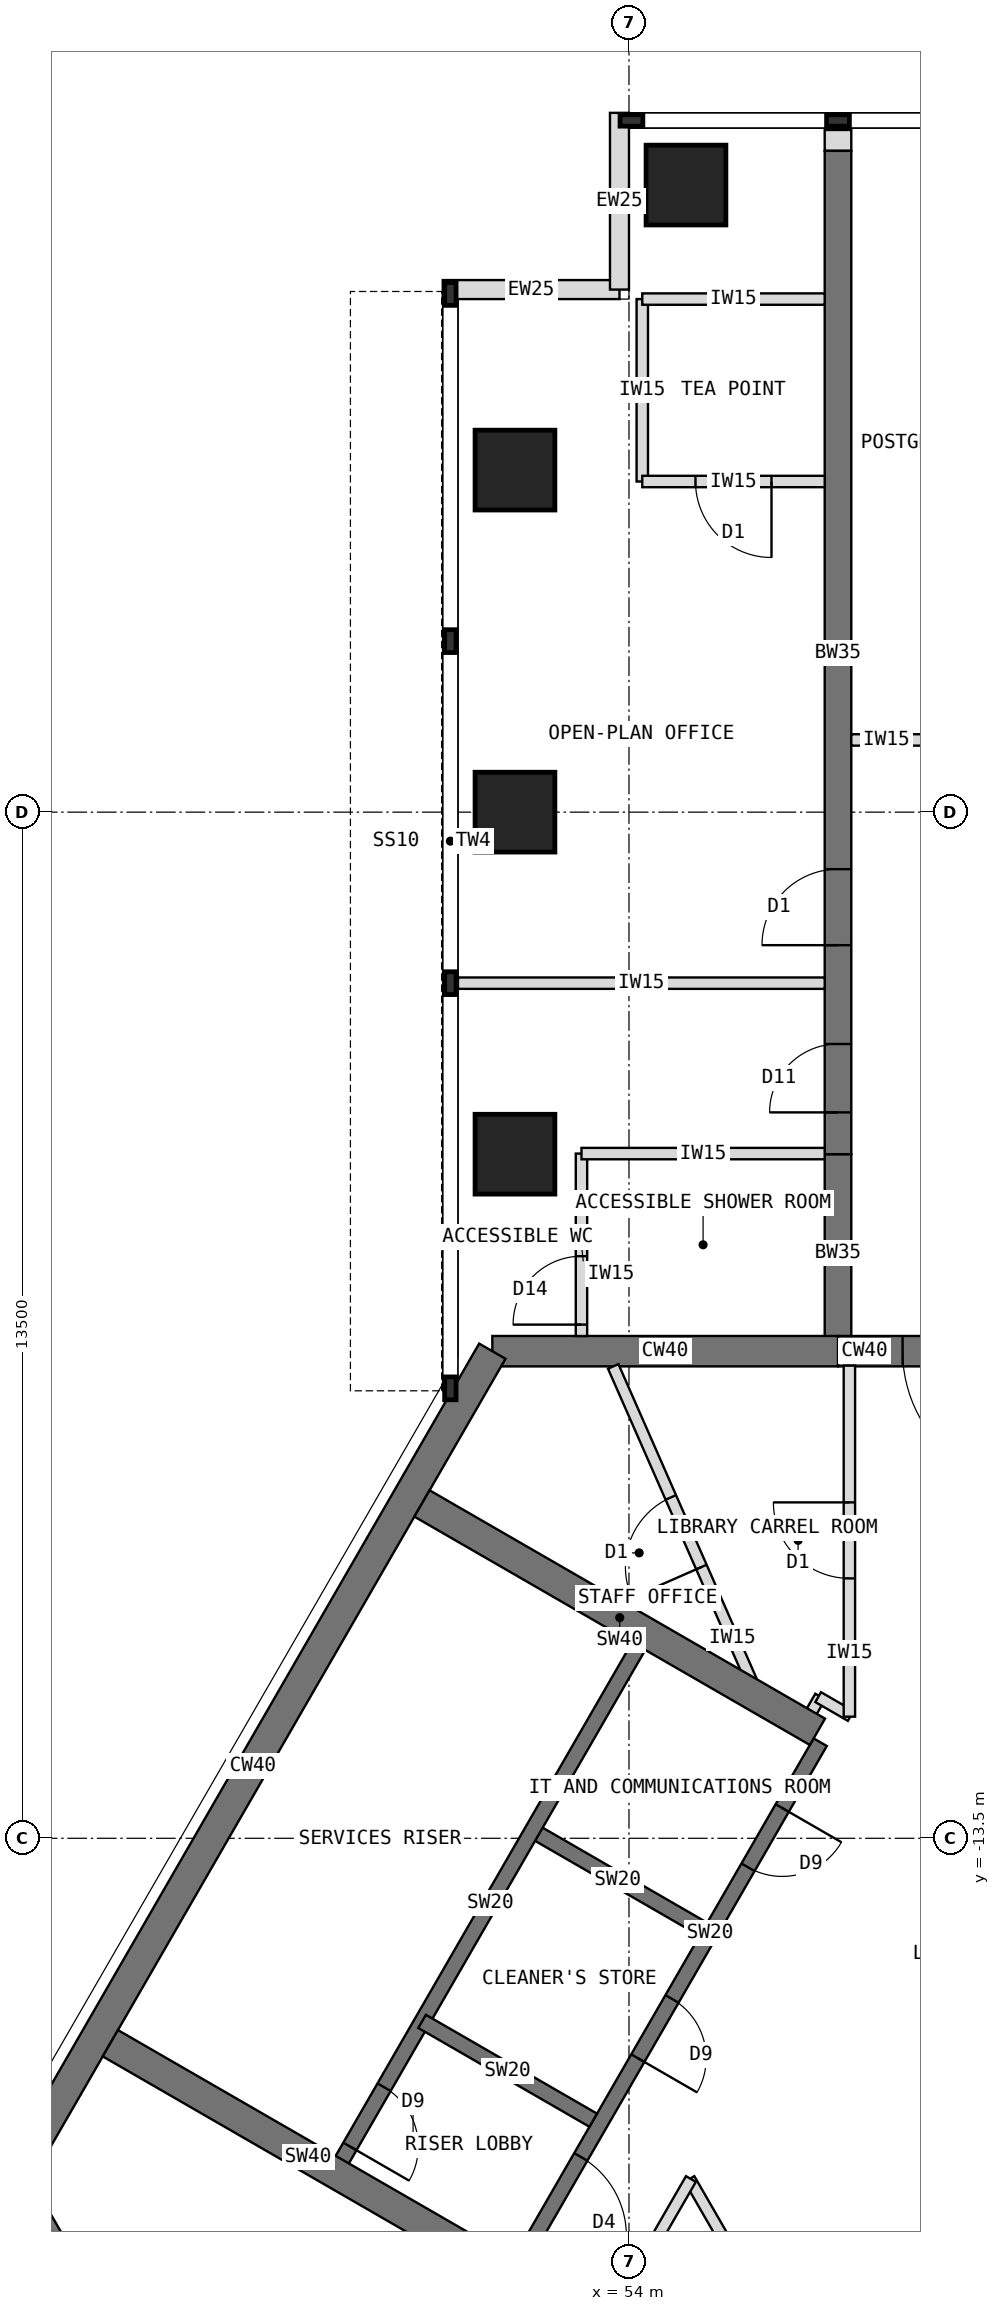
"""IFC4 building model, lengths in metres.
Left out: names, types, materials, properties, quantities, classifications, styles, units other than length and angle.
Written with IfcOpenShell. Run it as: python <this file> out.ifc"""

import sys

from ifc_helpers import new_model, si_unit, direction, frame, frame_2d, origin, origin_2d, place, context, subcontext, project, spatial, rectangle, extrude, element, fill, save


model = new_model("IFC4")
c1 = context("Model", 3, precision=1e-05, world=origin(), true_north=direction((0.0, 1.0)))
c2 = subcontext(c1, "Body", "Model", "MODEL_VIEW")
j1 = project(units=[si_unit("LENGTHUNIT", "METRE"), si_unit("PLANEANGLEUNIT", "RADIAN")], contexts=[c1])
p1 = place(None, origin())
s1 = spatial("IfcSite", under=j1, at=p1, CompositionType="ELEMENT")
p2 = place(p1, origin())
s2 = spatial("IfcBuilding", under=s1, at=p2, CompositionType="ELEMENT")
p3 = place(p2, frame((0.0, 0.0, 251.5)))
s3 = spatial("IfcBuildingStorey", under=s2, at=p3, CompositionType="ELEMENT", Elevation=251.5)
p4 = place(p3, frame((60.25, -7.092, 0.0), z_axis=(0.0, 0.0, 1.0), x_axis=(-1.0, 0.0, 0.0)))
e1 = element("IfcWall", 1, at=p4, inside=s3, PredefinedType="SHEAR", context=c2, shape_type="SweptSolid", body=[
    extrude(rectangle(XDim=3.5, YDim=0.4, at=frame_2d((1.75, 0.0))), origin(), (0.0, 0.0, 1.0), 4.0),
])
p5 = place(p4, frame((0.85, 0.0, 0.0)))
e2 = element("IfcOpeningElement", 2, at=p5, cuts=e1, PredefinedType="OPENING", context=c2, shape_type="SweptSolid", body=[
    extrude(rectangle(XDim=1.8, YDim=2.1, at=frame_2d((0.9, 1.05))), frame((0.0, 0.21, 0.0), z_axis=(0.0, -1.0, 0.0), x_axis=(1.0, 0.0, 0.0)), (0.0, 0.0, 1.0), 0.42),
])
p6 = place(p3, frame((56.75, -7.092, 0.0), z_axis=(0.0, 0.0, 1.0), x_axis=(-1.0, 0.0, 0.0)))
e3 = element("IfcWall", 3, at=p6, inside=s3, PredefinedType="SHEAR", context=c2, shape_type="SweptSolid", body=[
    extrude(rectangle(XDim=4.548, YDim=0.4, at=frame_2d((2.274, 0.0))), origin(), (0.0, 0.0, 1.0), 4.0),
])
p7 = place(p3, frame((52.202, -7.092, 0.0), z_axis=(0.0, 0.0, 1.0), x_axis=(-0.500005998175, -0.866021940709, 0.0)))
e4 = element("IfcWall", 4, at=p7, inside=s3, PredefinedType="SHEAR", context=c2, shape_type="SweptSolid", body=[
    extrude(rectangle(XDim=12.596, YDim=0.4, at=frame_2d((6.298, 0.0))), origin(), (0.0, 0.0, 1.0), 4.0),
])
p8 = place(p3, frame((45.904, -18.0, 0.0), z_axis=(0.0, 0.0, 1.0), x_axis=(0.500024481964, -0.866011268655, 0.0)))
e5 = element("IfcWall", 5, at=p8, inside=s3, PredefinedType="SHEAR", context=c2, shape_type="SweptSolid", body=[
    extrude(rectangle(XDim=4.548, YDim=0.4, at=frame_2d((2.274, 0.0))), origin(), (0.0, 0.0, 1.0), 4.0),
])
p9 = place(p3, frame((56.75, -7.092, 0.0), z_axis=(0.0, 0.0, 1.0), x_axis=(0.0, 1.0, 0.0)))
e6 = element("IfcWall", 6, at=p9, inside=s3, PredefinedType="SHEAR", context=c2, shape_type="SweptSolid", body=[
    extrude(rectangle(XDim=2.592, YDim=0.35, at=frame_2d((1.296, 0.0))), origin(), (0.0, 0.0, 1.0), 4.0),
])
p10 = place(p3, frame((56.75, -4.5, 0.0), z_axis=(0.0, 0.0, 1.0), x_axis=(0.0, 1.0, 0.0)))
e7 = element("IfcWall", 7, at=p10, inside=s3, PredefinedType="SHEAR", context=c2, shape_type="SweptSolid", body=[
    extrude(rectangle(XDim=13.2, YDim=0.35, at=frame_2d((6.6, 0.0))), origin(), (0.0, 0.0, 1.0), 4.0),
])
p11 = place(p10, frame((0.55, 0.0, 0.0)))
e8 = element("IfcOpeningElement", 8, at=p11, cuts=e7, PredefinedType="OPENING", context=c2, shape_type="SweptSolid", body=[
    extrude(rectangle(XDim=0.9, YDim=2.1, at=frame_2d((0.45, 1.05))), frame((0.0, 0.185, 0.0), z_axis=(0.0, -1.0, 0.0), x_axis=(1.0, 0.0, 0.0)), (0.0, 0.0, 1.0), 0.37),
])
p12 = place(p10, frame((2.75, 0.0, 0.0)))
e9 = element("IfcOpeningElement", 9, at=p12, cuts=e7, PredefinedType="OPENING", context=c2, shape_type="SweptSolid", body=[
    extrude(rectangle(XDim=1.0, YDim=2.1, at=frame_2d((0.5, 1.05))), frame((0.0, 0.185, 0.0), z_axis=(0.0, -1.0, 0.0), x_axis=(1.0, 0.0, 0.0)), (0.0, 0.0, 1.0), 0.37),
])
for number, where, z_axis, x_axis in (
    (10, (52.5, -4.5, 0.0), (0.0, 0.0, 1.0), (1.0, 0.0, 0.0)),
    (11, (52.5, 0.0, 0.0), (0.0, 0.0, 1.0), (1.0, 0.0, 0.0)),
    (12, (52.5, 4.5, 0.0), (0.0, 0.0, 1.0), (1.0, 0.0, 0.0)),
    (13, (54.75, 8.25, 0.0), (0.0, 0.0, 1.0), (1.0, 0.0, 0.0)),
):
    element("IfcColumn", number, at=place(p3, frame(where, z_axis=z_axis, x_axis=x_axis)), inside=s3, PredefinedType="COLUMN", context=c2, shape_type="SweptSolid", body=[
        extrude(rectangle(XDim=1.05, YDim=1.05, at=origin_2d()), origin(), (0.0, 0.0, 1.0), 4.0),
    ])
for number, where, z_axis, x_axis in (
    (14, (51.55, 6.875, 0.0), (0.0, 0.0, 1.0), (1.0, 0.0, 0.0)),
    (15, (53.875, 6.875, 0.0), (0.0, 0.0, 1.0), (0.0, 1.0, 0.0)),
):
    element("IfcWall", number, at=place(p3, frame(where, z_axis=z_axis, x_axis=x_axis)), inside=s3, PredefinedType="STANDARD", context=c2, shape_type="SweptSolid", body=[
        extrude(rectangle(XDim=2.325, YDim=0.25, at=frame_2d((1.163, 0.0))), origin(), (0.0, 0.0, 1.0), 3.8),
    ])
p13 = place(p3, frame((56.75, 8.7, 0.0), z_axis=(0.0, 0.0, 1.0), x_axis=(0.0, 1.0, 0.0)))
e16 = element("IfcWall", 16, at=p13, inside=s3, PredefinedType="PARTITIONING", context=c2, shape_type="SweptSolid", body=[
    extrude(rectangle(XDim=0.275, YDim=0.35, at=frame_2d((0.138, 0.0))), origin(), (0.0, 0.0, 1.0), 3.8),
])
p14 = place(p3, frame((56.516, -12.236, 0.0), z_axis=(0.0, 0.0, 1.0), x_axis=(-0.49999894854, -0.866026010844, 0.0)))
e17 = element("IfcWall", 17, at=p14, inside=s3, PredefinedType="SHEAR", context=c2, shape_type="SweptSolid", body=[
    extrude(rectangle(XDim=8.0, YDim=0.2, at=frame_2d((4.0, 0.0))), origin(), (0.0, 0.0, 1.0), 4.0),
])
p15 = place(p14, frame((6.3, 0.0, 0.0)))
e18 = element("IfcOpeningElement", 18, at=p15, cuts=e17, PredefinedType="OPENING", context=c2, shape_type="SweptSolid", body=[
    extrude(rectangle(XDim=1.2, YDim=2.1, at=frame_2d((0.6, 1.05))), frame((0.0, 0.11, 0.0), z_axis=(0.0, -1.0, 0.0), x_axis=(1.0, 0.0, 0.0)), (0.0, 0.0, 1.0), 0.22),
])
p16 = place(p14, frame((1.0, 0.0, 0.0)))
e19 = element("IfcOpeningElement", 19, at=p16, cuts=e17, PredefinedType="OPENING", context=c2, shape_type="SweptSolid", body=[
    extrude(rectangle(XDim=0.9, YDim=2.1, at=frame_2d((0.45, 1.05))), frame((0.0, 0.11, 0.0), z_axis=(0.0, -1.0, 0.0), x_axis=(1.0, 0.0, 0.0)), (0.0, 0.0, 1.0), 0.22),
])
p17 = place(p14, frame((3.9, 0.0, 0.0)))
e20 = element("IfcOpeningElement", 20, at=p17, cuts=e17, PredefinedType="OPENING", context=c2, shape_type="SweptSolid", body=[
    extrude(rectangle(XDim=0.9, YDim=2.1, at=frame_2d((0.45, 1.05))), frame((0.0, 0.11, 0.0), z_axis=(0.0, -1.0, 0.0), x_axis=(1.0, 0.0, 0.0)), (0.0, 0.0, 1.0), 0.22),
])
for number, where, z_axis, x_axis in (
    (21, (54.98, -14.697, 0.0), (0.0, 0.0, 1.0), (-0.866, 0.5, 0.0)),
    (22, (53.53, -17.209, 0.0), (0.0, 0.0, 1.0), (-0.866, 0.5, 0.0)),
):
    element("IfcWall", number, at=place(p3, frame(where, z_axis=z_axis, x_axis=x_axis)), inside=s3, PredefinedType="SHEAR", context=c2, shape_type="SweptSolid", body=[
        extrude(rectangle(XDim=2.6, YDim=0.2, at=frame_2d((1.3, 0.0))), origin(), (0.0, 0.0, 1.0), 4.0),
    ])
p18 = place(p3, frame((54.178, -10.886, 0.0), z_axis=(0.0, 0.0, 1.0), x_axis=(-0.49999894854, -0.866026010844, 0.0)))
e23 = element("IfcWall", 23, at=p18, inside=s3, PredefinedType="SHEAR", context=c2, shape_type="SweptSolid", body=[
    extrude(rectangle(XDim=8.0, YDim=0.2, at=frame_2d((4.0, 0.0))), origin(), (0.0, 0.0, 1.0), 4.0),
])
p19 = place(p18, frame((6.8, 0.0, 0.0)))
e24 = element("IfcOpeningElement", 24, at=p19, cuts=e23, PredefinedType="OPENING", context=c2, shape_type="SweptSolid", body=[
    extrude(rectangle(XDim=0.9, YDim=2.1, at=frame_2d((0.45, 1.05))), frame((0.0, 0.11, 0.0), z_axis=(0.0, -1.0, 0.0), x_axis=(1.0, 0.0, 0.0)), (0.0, 0.0, 1.0), 0.22),
])
for number, where, z_axis, x_axis in (
    (25, (52.38, -19.201, 0.0), (0.0, 0.0, 1.0), (-0.866, 0.5, 0.0)),
    (26, (56.48, -12.099, 0.0), (0.0, 0.0, 1.0), (-0.866, 0.5, 0.0)),
):
    element("IfcWall", number, at=place(p3, frame(where, z_axis=z_axis, x_axis=x_axis)), inside=s3, PredefinedType="SHEAR", context=c2, shape_type="SweptSolid", body=[
        extrude(rectangle(XDim=6.008, YDim=0.4, at=frame_2d((3.004, 0.0))), origin(), (0.0, 0.0, 1.0), 4.0),
    ])
p20 = place(p3, frame((56.575, -2.25, 0.0), z_axis=(0.0, 0.0, 1.0), x_axis=(-1.0, 0.0, 0.0)))
e27 = element("IfcWall", 27, at=p20, inside=s3, PredefinedType="PARTITIONING", context=c2, shape_type="SweptSolid", body=[
    extrude(rectangle(XDim=4.825, YDim=0.15, at=frame_2d((2.413, 0.0))), origin(), (0.0, 0.0, 1.0), 3.8),
])
p21 = place(p3, frame((54.175, 4.35, 0.0), z_axis=(0.0, 0.0, 1.0), x_axis=(0.0, 1.0, 0.0)))
e28 = element("IfcWall", 28, at=p21, inside=s3, PredefinedType="PARTITIONING", context=c2, shape_type="SweptSolid", body=[
    extrude(rectangle(XDim=2.4, YDim=0.15, at=frame_2d((1.2, 0.0))), origin(), (0.0, 0.0, 1.0), 3.8),
])
p22 = place(p3, frame((56.575, 4.35, 0.0), z_axis=(0.0, 0.0, 1.0), x_axis=(-1.0, 0.0, 0.0)))
e29 = element("IfcWall", 29, at=p22, inside=s3, PredefinedType="PARTITIONING", context=c2, shape_type="SweptSolid", body=[
    extrude(rectangle(XDim=2.4, YDim=0.15, at=frame_2d((1.2, 0.0))), origin(), (0.0, 0.0, 1.0), 3.8),
])
p23 = place(p22, frame((0.7, 0.0, 0.0)))
e30 = element("IfcOpeningElement", 30, at=p23, cuts=e29, PredefinedType="OPENING", context=c2, shape_type="SweptSolid", body=[
    extrude(rectangle(XDim=1.0, YDim=2.1, at=frame_2d((0.5, 1.05))), frame((0.0, 0.085, 0.0), z_axis=(0.0, -1.0, 0.0), x_axis=(1.0, 0.0, 0.0)), (0.0, 0.0, 1.0), 0.17),
])
p24 = place(p3, frame((56.575, 6.75, 0.0), z_axis=(0.0, 0.0, 1.0), x_axis=(-1.0, 0.0, 0.0)))
e31 = element("IfcWall", 31, at=p24, inside=s3, PredefinedType="PARTITIONING", context=c2, shape_type="SweptSolid", body=[
    extrude(rectangle(XDim=2.4, YDim=0.15, at=frame_2d((1.2, 0.0))), origin(), (0.0, 0.0, 1.0), 3.8),
])
p25 = place(p3, frame((53.375, -6.892, 0.0), z_axis=(0.0, 0.0, 1.0), x_axis=(0.0, 1.0, 0.0)))
e32 = element("IfcWall", 32, at=p25, inside=s3, PredefinedType="PARTITIONING", context=c2, shape_type="SweptSolid", body=[
    extrude(rectangle(XDim=2.4, YDim=0.15, at=frame_2d((1.2, 0.0))), origin(), (0.0, 0.0, 1.0), 3.8),
])
p26 = place(p25, frame((0.15, 0.0, 0.0)))
e33 = element("IfcOpeningElement", 33, at=p26, cuts=e32, PredefinedType="OPENING", context=c2, shape_type="SweptSolid", body=[
    extrude(rectangle(XDim=0.9, YDim=2.1, at=frame_2d((0.45, 1.05))), frame((0.0, 0.085, 0.0), z_axis=(0.0, -1.0, 0.0), x_axis=(1.0, 0.0, 0.0)), (0.0, 0.0, 1.0), 0.17),
])
p27 = place(p3, frame((56.575, -4.492, 0.0), z_axis=(0.0, 0.0, 1.0), x_axis=(-1.0, 0.0, 0.0)))
e34 = element("IfcWall", 34, at=p27, inside=s3, PredefinedType="PARTITIONING", context=c2, shape_type="SweptSolid", body=[
    extrude(rectangle(XDim=3.2, YDim=0.15, at=frame_2d((1.6, 0.0))), origin(), (0.0, 0.0, 1.0), 3.267),
])
p28 = place(p3, frame((55.955, -19.992, 0.0), z_axis=(0.0, 0.0, 1.0), x_axis=(-0.499941024108, 0.866059450854, 0.0)))
e35 = element("IfcWall", 35, at=p28, inside=s3, PredefinedType="PARTITIONING", context=c2, shape_type="SweptSolid", body=[
    extrude(rectangle(XDim=2.321, YDim=0.15, at=frame_2d((1.16, 0.0))), origin(), (0.0, 0.0, 1.0), 3.8),
])
p29 = place(p3, frame((54.815, -17.983, 0.0), z_axis=(0.0, 0.0, 1.0), x_axis=(-0.499981473571, -0.866036099759, 0.0)))
e36 = element("IfcWall", 36, at=p29, inside=s3, PredefinedType="PARTITIONING", context=c2, shape_type="SweptSolid", body=[
    extrude(rectangle(XDim=2.692, YDim=0.15, at=frame_2d((1.346, 0.0))), origin(), (0.0, 0.0, 1.0), 3.8),
])
p30 = place(p3, frame((56.302, -12.008, 0.0), z_axis=(0.0, 0.0, 1.0), x_axis=(0.500230298122, 0.865892400268, 0.0)))
e37 = element("IfcWall", 37, at=p30, inside=s3, PredefinedType="PARTITIONING", context=c2, shape_type="SweptSolid", body=[
    extrude(rectangle(XDim=0.43, YDim=0.15, at=frame_2d((0.215, 0.0))), origin(), (0.0, 0.0, 1.0), 3.8),
])
p31 = place(p3, frame((56.489, -11.643, 0.0), z_axis=(0.0, 0.0, 1.0), x_axis=(0.865831790172, -0.50033519877, 0.0)))
e38 = element("IfcWall", 38, at=p31, inside=s3, PredefinedType="PARTITIONING", context=c2, shape_type="SweptSolid", body=[
    extrude(rectangle(XDim=0.494, YDim=0.15, at=frame_2d((0.247, 0.0))), origin(), (0.0, 0.0, 1.0), 3.8),
])
p32 = place(p3, frame((56.9, -11.9, 0.0), z_axis=(0.0, 0.0, 1.0), x_axis=(0.0, 1.0, 0.0)))
e39 = element("IfcWall", 39, at=p32, inside=s3, PredefinedType="PARTITIONING", context=c2, shape_type="SweptSolid", body=[
    extrude(rectangle(XDim=4.618, YDim=0.15, at=frame_2d((2.309, 0.0))), origin(), (0.0, 0.0, 1.0), 3.8),
])
p33 = place(p32, frame((1.819, 0.0, 0.0)))
e40 = element("IfcOpeningElement", 40, at=p33, cuts=e39, PredefinedType="OPENING", context=c2, shape_type="SweptSolid", body=[
    extrude(rectangle(XDim=1.0, YDim=2.1, at=frame_2d((0.5, 1.05))), frame((0.0, 0.085, 0.0), z_axis=(0.0, -1.0, 0.0), x_axis=(1.0, 0.0, 0.0)), (0.0, 0.0, 1.0), 0.17),
])
p34 = place(p3, frame((55.711, -11.656, 0.0), z_axis=(0.0, 0.0, 1.0), x_axis=(-0.402457111937, 0.915438841787, 0.0)))
e41 = element("IfcWall", 41, at=p34, inside=s3, PredefinedType="PARTITIONING", context=c2, shape_type="SweptSolid", body=[
    extrude(rectangle(XDim=4.767, YDim=0.15, at=frame_2d((2.383, 0.0))), origin(), (0.0, 0.0, 1.0), 3.8),
])
p35 = place(p34, frame((1.883, 0.0, 0.0)))
e42 = element("IfcOpeningElement", 42, at=p35, cuts=e41, PredefinedType="OPENING", context=c2, shape_type="SweptSolid", body=[
    extrude(rectangle(XDim=1.0, YDim=2.1, at=frame_2d((0.5, 1.05))), frame((0.0, 0.085, 0.0), z_axis=(0.0, -1.0, 0.0), x_axis=(1.0, 0.0, 0.0)), (0.0, 0.0, 1.0), 0.17),
])
p36 = place(p3, frame((60.075, 0.95, 0.0), z_axis=(0.0, 0.0, 1.0), x_axis=(-1.0, 0.0, 0.0)))
e43 = element("IfcWall", 43, at=p36, inside=s3, PredefinedType="PARTITIONING", context=c2, shape_type="SweptSolid", body=[
    extrude(rectangle(XDim=3.15, YDim=0.15, at=frame_2d((1.575, 0.0))), origin(), (0.0, 0.0, 1.0), 3.8),
])
p37 = place(p36, frame((1.075, 0.0, 0.0)))
e44 = element("IfcOpeningElement", 44, at=p37, cuts=e43, PredefinedType="OPENING", context=c2, shape_type="SweptSolid", body=[
    extrude(rectangle(XDim=1.0, YDim=2.1, at=frame_2d((0.5, 1.05))), frame((0.0, 0.085, 0.0), z_axis=(0.0, -1.0, 0.0), x_axis=(1.0, 0.0, 0.0)), (0.0, 0.0, 1.0), 0.17),
])
p38 = place(p15, origin())
e45 = element("IfcDoor", 45, at=p38, inside=s3, OperationType="SINGLE_SWING_RIGHT", PredefinedType="DOOR", context=c2, shape_type="SweptSolid", body=[
    extrude(rectangle(XDim=1.2, YDim=2.1, at=frame_2d((0.6, 1.05))), frame((0.0, 0.025, 0.0), z_axis=(0.0, -1.0, 0.0), x_axis=(1.0, 0.0, 0.0)), (0.0, 0.0, 1.0), 0.05),
])
fill(e18, e45)
p39 = place(p19, origin())
e46 = element("IfcDoor", 46, at=p39, inside=s3, OperationType="SINGLE_SWING_RIGHT", PredefinedType="DOOR", context=c2, shape_type="SweptSolid", body=[
    extrude(rectangle(XDim=0.9, YDim=2.1, at=frame_2d((0.45, 1.05))), frame((0.0, 0.025, 0.0), z_axis=(0.0, -1.0, 0.0), x_axis=(1.0, 0.0, 0.0)), (0.0, 0.0, 1.0), 0.05),
])
fill(e24, e46)
p40 = place(p5, origin())
e47 = element("IfcDoor", 47, at=p40, inside=s3, OperationType="DOUBLE_DOOR_DOUBLE_SWING", PredefinedType="DOOR", context=c2, shape_type="SweptSolid", body=[
    extrude(rectangle(XDim=1.8, YDim=2.1, at=frame_2d((0.9, 1.05))), frame((0.0, 0.025, 0.0), z_axis=(0.0, -1.0, 0.0), x_axis=(1.0, 0.0, 0.0)), (0.0, 0.0, 1.0), 0.05),
])
fill(e2, e47)
p41 = place(p23, origin())
e48 = element("IfcDoor", 48, at=p41, inside=s3, OperationType="SINGLE_SWING_LEFT", PredefinedType="DOOR", context=c2, shape_type="SweptSolid", body=[
    extrude(rectangle(XDim=1.0, YDim=2.1, at=frame_2d((0.5, 1.05))), frame((0.0, 0.025, 0.0), z_axis=(0.0, -1.0, 0.0), x_axis=(1.0, 0.0, 0.0)), (0.0, 0.0, 1.0), 0.05),
])
fill(e30, e48)
p42 = place(p26, origin())
e49 = element("IfcDoor", 49, at=p42, inside=s3, OperationType="SINGLE_SWING_LEFT", PredefinedType="DOOR", context=c2, shape_type="SweptSolid", body=[
    extrude(rectangle(XDim=0.9, YDim=2.1, at=frame_2d((0.45, 1.05))), frame((0.0, 0.025, 0.0), z_axis=(0.0, -1.0, 0.0), x_axis=(1.0, 0.0, 0.0)), (0.0, 0.0, 1.0), 0.05),
])
fill(e33, e49)
p43 = place(p35, origin())
e50 = element("IfcDoor", 50, at=p43, inside=s3, OperationType="SINGLE_SWING_LEFT", PredefinedType="DOOR", context=c2, shape_type="SweptSolid", body=[
    extrude(rectangle(XDim=1.0, YDim=2.1, at=frame_2d((0.5, 1.05))), frame((0.0, 0.025, 0.0), z_axis=(0.0, -1.0, 0.0), x_axis=(1.0, 0.0, 0.0)), (0.0, 0.0, 1.0), 0.05),
])
fill(e42, e50)
p44 = place(p33, origin())
e51 = element("IfcDoor", 51, at=p44, inside=s3, OperationType="SINGLE_SWING_RIGHT", PredefinedType="DOOR", context=c2, shape_type="SweptSolid", body=[
    extrude(rectangle(XDim=1.0, YDim=2.1, at=frame_2d((0.5, 1.05))), frame((0.0, 0.025, 0.0), z_axis=(0.0, -1.0, 0.0), x_axis=(1.0, 0.0, 0.0)), (0.0, 0.0, 1.0), 0.05),
])
fill(e40, e51)
p45 = place(p11, origin())
e52 = element("IfcDoor", 52, at=p45, inside=s3, OperationType="SINGLE_SWING_LEFT", PredefinedType="DOOR", context=c2, shape_type="SweptSolid", body=[
    extrude(rectangle(XDim=0.9, YDim=2.1, at=frame_2d((0.45, 1.05))), frame((0.0, 0.025, 0.0), z_axis=(0.0, -1.0, 0.0), x_axis=(1.0, 0.0, 0.0)), (0.0, 0.0, 1.0), 0.05),
])
fill(e8, e52)
p46 = place(p12, origin())
e53 = element("IfcDoor", 53, at=p46, inside=s3, OperationType="SINGLE_SWING_LEFT", PredefinedType="DOOR", context=c2, shape_type="SweptSolid", body=[
    extrude(rectangle(XDim=1.0, YDim=2.1, at=frame_2d((0.5, 1.05))), frame((0.0, 0.025, 0.0), z_axis=(0.0, -1.0, 0.0), x_axis=(1.0, 0.0, 0.0)), (0.0, 0.0, 1.0), 0.05),
])
fill(e9, e53)
p47 = place(p16, origin())
e54 = element("IfcDoor", 54, at=p47, inside=s3, OperationType="SINGLE_SWING_LEFT", PredefinedType="DOOR", context=c2, shape_type="SweptSolid", body=[
    extrude(rectangle(XDim=0.9, YDim=2.1, at=frame_2d((0.45, 1.05))), frame((0.0, 0.025, 0.0), z_axis=(0.0, -1.0, 0.0), x_axis=(1.0, 0.0, 0.0)), (0.0, 0.0, 1.0), 0.05),
])
fill(e19, e54)
p48 = place(p17, origin())
e55 = element("IfcDoor", 55, at=p48, inside=s3, OperationType="SINGLE_SWING_RIGHT", PredefinedType="DOOR", context=c2, shape_type="SweptSolid", body=[
    extrude(rectangle(XDim=0.9, YDim=2.1, at=frame_2d((0.45, 1.05))), frame((0.0, 0.025, 0.0), z_axis=(0.0, -1.0, 0.0), x_axis=(1.0, 0.0, 0.0)), (0.0, 0.0, 1.0), 0.05),
])
fill(e20, e55)
save(model, sys.argv[1])
